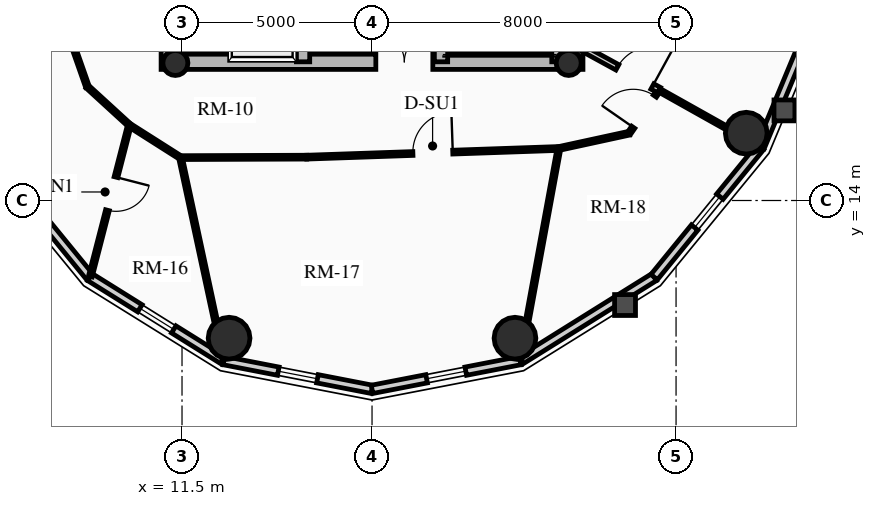
"""IFC4 building model, lengths in metres.
Left out: names, types, materials, properties, quantities, classifications, styles, units other than length and angle.
Written with IfcOpenShell. Run it as: python <this file> out.ifc"""

import sys

from ifc_helpers import new_model, si_unit, direction, frame, frame_2d, origin, origin_2d, place, context, subcontext, project, spatial, rectangle, circle, hollow_circle, extrude, source, transform, mapped, element, fill, save


model = new_model("IFC4")
c1 = context("Model", 3, precision=1e-05, world=origin(), true_north=direction((0.0, 1.0)))
c2 = subcontext(c1, "Body", "Model", "MODEL_VIEW")
j1 = project(units=[si_unit("LENGTHUNIT", "METRE"), si_unit("PLANEANGLEUNIT", "RADIAN")], contexts=[c1])
p1 = place(None, origin())
s1 = spatial("IfcSite", under=j1, at=p1, CompositionType="ELEMENT")
p2 = place(p1, origin())
s2 = spatial("IfcBuilding", under=s1, at=p2, CompositionType="ELEMENT")
p3 = place(p2, frame((0.0, 0.0, 229.25)))
s3 = spatial("IfcBuildingStorey", under=s2, at=p3, CompositionType="ELEMENT", Elevation=229.25)
for number, where, z_axis, x_axis in (
    (1, (11.15, 17.45, 0.0), (0.0, 0.0, 1.0), (0.0, 1.0, 0.0)),
    (2, (21.85, 17.45, 0.0), (0.0, 0.0, 1.0), (0.0, 1.0, 0.0)),
):
    element("IfcWall", number, at=place(p3, frame(where, z_axis=z_axis, x_axis=x_axis)), inside=s3, PredefinedType="SHEAR", context=c2, shape_type="SweptSolid", body=[
        extrude(rectangle(XDim=14.1, YDim=0.4, at=frame_2d((7.05, 0.0))), origin(), (0.0, 0.0, 1.0), 3.2),
    ])
p4 = place(p3, frame((11.15, 17.65, 0.0), z_axis=(0.0, 0.0, 1.0), x_axis=(1.0, 0.0, 0.0)))
e3 = element("IfcWall", 3, at=p4, inside=s3, PredefinedType="SHEAR", context=c2, shape_type="SweptSolid", body=[
    extrude(rectangle(XDim=10.7, YDim=0.4, at=frame_2d((5.35, 0.0))), origin(), (0.0, 0.0, 1.0), 3.2),
])
m1 = source(origin(), c2, "Body", "SweptSolid", [
    extrude(rectangle(XDim=1.5, YDim=2.02, at=frame_2d((0.75, 1.01))), frame((0.0, 0.21, 0.0), z_axis=(0.0, -1.0, 0.0), x_axis=(1.0, 0.0, 0.0)), (0.0, 0.0, 1.0), 0.42),
])
p5 = place(p4, frame((5.45, 0.0, 0.0)))
e4 = element("IfcOpeningElement", 4, at=p5, cuts=e3, PredefinedType="OPENING", context=c2, shape_type="MappedRepresentation", body=[
    mapped(m1, transform((0.0, 0.0, 0.0), x_axis=(1.0, 0.0, 0.0), y_axis=(0.0, 1.0, 0.0), z_axis=(0.0, 0.0, 1.0), scale=1.0)),
])
p6 = place(p3, frame((14.685, 17.65, 0.0), z_axis=(0.0, 0.0, 1.0), x_axis=(0.0, 1.0, 0.0)))
e5 = element("IfcWall", 5, at=p6, inside=s3, PredefinedType="SHEAR", context=c2, shape_type="SweptSolid", body=[
    extrude(rectangle(XDim=13.7, YDim=0.35, at=frame_2d((6.85, 0.0))), origin(), (0.0, 0.0, 1.0), 3.2),
])
m2 = source(origin(), c2, "Body", "SweptSolid", [
    extrude(rectangle(XDim=1.1, YDim=2.015, at=frame_2d((0.55, 1.007))), frame((0.0, 0.185, 0.0), z_axis=(0.0, -1.0, 0.0), x_axis=(1.0, 0.0, 0.0)), (0.0, 0.0, 1.0), 0.37),
])
p7 = place(p6, frame((4.85, 0.0, 0.0)))
e6 = element("IfcOpeningElement", 6, at=p7, cuts=e5, PredefinedType="OPENING", context=c2, shape_type="MappedRepresentation", body=[
    mapped(m2, transform((0.0, 0.0, 0.0), x_axis=(1.0, 0.0, 0.0), y_axis=(0.0, 1.0, 0.0), z_axis=(0.0, 0.0, 1.0), scale=1.0)),
])
p8 = place(p6, frame((0.625, 0.0, 0.0)))
e7 = element("IfcOpeningElement", 7, at=p8, cuts=e5, PredefinedType="OPENING", context=c2, shape_type="MappedRepresentation", body=[
    mapped(m2, transform((0.0, 0.0, 0.0), x_axis=(1.0, 0.0, 0.0), y_axis=(0.0, 1.0, 0.0), z_axis=(0.0, 0.0, 1.0), scale=1.0)),
])
p9 = place(p6, frame((2.625, 0.0, 0.0)))
e8 = element("IfcOpeningElement", 8, at=p9, cuts=e5, PredefinedType="OPENING", context=c2, shape_type="MappedRepresentation", body=[
    mapped(m2, transform((0.0, 0.0, 0.0), x_axis=(1.0, 0.0, 0.0), y_axis=(0.0, 1.0, 0.0), z_axis=(0.0, 0.0, 1.0), scale=1.0)),
])
m3 = source(origin(), c2, "Body", "SweptSolid", [
    extrude(rectangle(XDim=1.15, YDim=2.02, at=frame_2d((0.575, 1.01))), frame((0.0, 0.185, 0.0), z_axis=(0.0, -1.0, 0.0), x_axis=(1.0, 0.0, 0.0)), (0.0, 0.0, 1.0), 0.37),
])
p10 = place(p6, frame((7.27, 0.0, 0.0)))
e9 = element("IfcOpeningElement", 9, at=p10, cuts=e5, PredefinedType="OPENING", context=c2, shape_type="MappedRepresentation", body=[
    mapped(m3, transform((0.0, 0.0, 0.0), x_axis=(1.0, 0.0, 0.0), y_axis=(0.0, 1.0, 0.0), z_axis=(0.0, 0.0, 1.0), scale=1.0)),
])
p11 = place(p3, frame((18.315, 17.65, 0.0), z_axis=(0.0, 0.0, 1.0), x_axis=(0.0, 1.0, 0.0)))
e10 = element("IfcWall", 10, at=p11, inside=s3, PredefinedType="SHEAR", context=c2, shape_type="SweptSolid", body=[
    extrude(rectangle(XDim=9.6, YDim=0.35, at=frame_2d((4.8, 0.0))), origin(), (0.0, 0.0, 1.0), 3.2),
])
p12 = place(p11, frame((5.28, 0.0, 0.0)))
e11 = element("IfcOpeningElement", 11, at=p12, cuts=e10, PredefinedType="OPENING", context=c2, shape_type="MappedRepresentation", body=[
    mapped(m3, transform((0.0, 0.0, 0.0), x_axis=(1.0, 0.0, 0.0), y_axis=(0.0, 1.0, 0.0), z_axis=(0.0, 0.0, 1.0), scale=1.0)),
])
p13 = place(p3, frame((21.405, 17.65, 0.0), z_axis=(0.0, 0.0, 1.0), x_axis=(0.0, 1.0, 0.0)))
e12 = element("IfcWall", 12, at=p13, inside=s3, PredefinedType="SHEAR", context=c2, shape_type="SweptSolid", body=[
    extrude(rectangle(XDim=6.695, YDim=0.35, at=frame_2d((3.348, 0.0))), origin(), (0.0, 0.0, 1.0), 3.2),
])
for number, where, z_axis, x_axis in (
    (13, (11.325, 17.62, 0.0), (0.0, 0.0, 1.0), (1.0, 0.0, 0.0)),
    (14, (21.675, 17.62, 0.0), (0.0, 0.0, 1.0), (1.0, 0.0, 0.0)),
):
    element("IfcColumn", number, at=place(p3, frame(where, z_axis=z_axis, x_axis=x_axis)), inside=s3, PredefinedType="COLUMN", context=c2, shape_type="SweptSolid", body=[
        extrude(hollow_circle(Radius=0.33, WallThickness=0.025, at=origin_2d()), origin(), (0.0, 0.0, 1.0), 3.2),
    ])
for number, where, z_axis, x_axis in (
    (15, (12.739, 10.377, 0.0), (0.0, 0.0, 1.0), (1.0, 0.0, 0.0)),
    (16, (20.261, 10.377, 0.0), (0.0, 0.0, 1.0), (1.0, 0.0, 0.0)),
    (17, (26.347, 15.771, 0.0), (0.0, 0.0, 1.0), (1.0, 0.0, 0.0)),
):
    element("IfcColumn", number, at=place(p3, frame(where, z_axis=z_axis, x_axis=x_axis)), inside=s3, PredefinedType="USERDEFINED", context=c2, shape_type="SweptSolid", body=[
        extrude(circle(Radius=0.55, at=origin_2d()), origin(), (0.0, 0.0, 1.0), 3.2),
    ])
p14 = place(p3, frame((9.076, 11.985, 0.0), z_axis=(0.0, 0.0, 1.0), x_axis=(-0.632467166636, 0.774587169483, 0.0)))
e18 = element("IfcWall", 18, at=p14, inside=s3, PredefinedType="SOLIDWALL", context=c2, shape_type="SweptSolid", body=[
    extrude(rectangle(XDim=4.418, YDim=0.22, at=frame_2d((2.209, 0.0))), origin(), (0.0, 0.0, 1.0), 2.612),
])
p15 = place(p3, frame((12.597, 9.787, 0.0), z_axis=(0.0, 0.0, 1.0), x_axis=(-0.848318713376, 0.529485939886, 0.0)))
e19 = element("IfcWall", 19, at=p15, inside=s3, PredefinedType="SOLIDWALL", context=c2, shape_type="SweptSolid", body=[
    extrude(rectangle(XDim=4.15, YDim=0.22, at=frame_2d((2.075, 0.0))), origin(), (0.0, 0.0, 1.0), 2.612),
])
m4 = source(origin(), c2, "Body", "SweptSolid", [
    extrude(rectangle(XDim=1.05, YDim=1.3, at=frame_2d((0.525, 0.65))), frame((0.0, 0.12, 0.0), z_axis=(0.0, -1.0, 0.0), x_axis=(1.0, 0.0, 0.0)), (0.0, 0.0, 1.0), 0.24),
])
p16 = place(p15, frame((1.55, 0.0, 0.65)))
e20 = element("IfcOpeningElement", 20, at=p16, cuts=e19, PredefinedType="OPENING", context=c2, shape_type="MappedRepresentation", body=[
    mapped(m4, transform((0.0, 0.0, 0.0), x_axis=(1.0, 0.0, 0.0), y_axis=(0.0, 1.0, 0.0), z_axis=(0.0, 0.0, 1.0), scale=1.0)),
])
p17 = place(p3, frame((16.5, 9.03, 0.0), z_axis=(0.0, 0.0, 1.0), x_axis=(-0.981700307484, 0.190432419211, 0.0)))
e21 = element("IfcWall", 21, at=p17, inside=s3, PredefinedType="SOLIDWALL", context=c2, shape_type="SweptSolid", body=[
    extrude(rectangle(XDim=3.976, YDim=0.22, at=frame_2d((1.988, 0.0))), origin(), (0.0, 0.0, 1.0), 2.612),
])
p18 = place(p17, frame((1.463, 0.0, 0.65)))
e22 = element("IfcOpeningElement", 22, at=p18, cuts=e21, PredefinedType="OPENING", context=c2, shape_type="MappedRepresentation", body=[
    mapped(m4, transform((0.0, 0.0, 0.0), x_axis=(1.0, 0.0, 0.0), y_axis=(0.0, 1.0, 0.0), z_axis=(0.0, 0.0, 1.0), scale=1.0)),
])
p19 = place(p3, frame((20.403, 9.787, 0.0), z_axis=(0.0, 0.0, 1.0), x_axis=(-0.981700307484, -0.190432419211, 0.0)))
e23 = element("IfcWall", 23, at=p19, inside=s3, PredefinedType="SOLIDWALL", context=c2, shape_type="SweptSolid", body=[
    extrude(rectangle(XDim=3.976, YDim=0.22, at=frame_2d((1.988, 0.0))), origin(), (0.0, 0.0, 1.0), 2.612),
])
p20 = place(p19, frame((1.463, 0.0, 0.65)))
e24 = element("IfcOpeningElement", 24, at=p20, cuts=e23, PredefinedType="OPENING", context=c2, shape_type="MappedRepresentation", body=[
    mapped(m4, transform((0.0, 0.0, 0.0), x_axis=(1.0, 0.0, 0.0), y_axis=(0.0, 1.0, 0.0), z_axis=(0.0, 0.0, 1.0), scale=1.0)),
])
p21 = place(p3, frame((23.924, 11.985, 0.0), z_axis=(0.0, 0.0, 1.0), x_axis=(-0.848318713376, -0.529485939886, 0.0)))
e25 = element("IfcWall", 25, at=p21, inside=s3, PredefinedType="SOLIDWALL", context=c2, shape_type="SweptSolid", body=[
    extrude(rectangle(XDim=4.15, YDim=0.22, at=frame_2d((2.075, 0.0))), origin(), (0.0, 0.0, 1.0), 2.612),
])
p22 = place(p3, frame((26.718, 15.407, 0.0), z_axis=(0.0, 0.0, 1.0), x_axis=(-0.632467166636, -0.774587169483, 0.0)))
e26 = element("IfcWall", 26, at=p22, inside=s3, PredefinedType="SOLIDWALL", context=c2, shape_type="SweptSolid", body=[
    extrude(rectangle(XDim=4.418, YDim=0.22, at=frame_2d((2.209, 0.0))), origin(), (0.0, 0.0, 1.0), 2.612),
])
p23 = place(p22, frame((1.684, 0.0, 0.65)))
e27 = element("IfcOpeningElement", 27, at=p23, cuts=e26, PredefinedType="OPENING", context=c2, shape_type="MappedRepresentation", body=[
    mapped(m4, transform((0.0, 0.0, 0.0), x_axis=(1.0, 0.0, 0.0), y_axis=(0.0, 1.0, 0.0), z_axis=(0.0, 0.0, 1.0), scale=1.0)),
])
p24 = place(p3, frame((28.512, 19.719, 0.0), z_axis=(0.0, 0.0, 1.0), x_axis=(-0.384036305194, -0.923317993052, 0.0)))
e28 = element("IfcWall", 28, at=p24, inside=s3, PredefinedType="SOLIDWALL", context=c2, shape_type="SweptSolid", body=[
    extrude(rectangle(XDim=4.671, YDim=0.22, at=frame_2d((2.335, 0.0))), origin(), (0.0, 0.0, 1.0), 2.612),
])
p25 = place(p3, frame((8.538, 18.338, 0.0), z_axis=(0.0, 0.0, 1.0), x_axis=(0.331358150167, -0.94350504838, 0.0)))
e29 = element("IfcWall", 29, at=p25, inside=s3, PredefinedType="MOVABLE", context=c2, shape_type="SweptSolid", body=[
    extrude(rectangle(XDim=1.424, YDim=0.1, at=frame_2d((0.712, 0.0))), origin(), (0.0, 0.0, 1.0), 2.545),
])
p26 = place(p3, frame((9.01, 16.994, 0.0), z_axis=(0.0, 0.0, 1.0), x_axis=(0.737701798986, -0.67512669609, 0.0)))
e30 = element("IfcWall", 30, at=p26, inside=s3, PredefinedType="MOVABLE", context=c2, shape_type="SweptSolid", body=[
    extrude(rectangle(XDim=1.498, YDim=0.1, at=frame_2d((0.749, 0.0))), origin(), (0.0, 0.0, 1.0), 2.612),
])
p27 = place(p3, frame((10.115, 15.983, 0.0), z_axis=(0.0, 0.0, 1.0), x_axis=(0.843995849351, -0.536349705209, 0.0)))
e31 = element("IfcWall", 31, at=p27, inside=s3, PredefinedType="MOVABLE", context=c2, shape_type="SweptSolid", body=[
    extrude(rectangle(XDim=1.593, YDim=0.1, at=frame_2d((0.796, 0.0))), origin(), (0.0, 0.0, 1.0), 2.545),
])
p28 = place(p3, frame((11.46, 15.129, 0.0), z_axis=(0.0, 0.0, 1.0), x_axis=(0.999993513287, 0.003601858435, 0.0)))
e32 = element("IfcWall", 32, at=p28, inside=s3, PredefinedType="MOVABLE", context=c2, shape_type="SweptSolid", body=[
    extrude(rectangle(XDim=3.321, YDim=0.1, at=frame_2d((1.661, 0.0))), origin(), (0.0, 0.0, 1.0), 2.612),
])
p29 = place(p3, frame((14.781, 15.141, 0.0), z_axis=(0.0, 0.0, 1.0), x_axis=(0.999407918707, 0.034406569513, 0.0)))
e33 = element("IfcWall", 33, at=p29, inside=s3, PredefinedType="MOVABLE", context=c2, shape_type="SweptSolid", body=[
    extrude(rectangle(XDim=6.642, YDim=0.1, at=frame_2d((3.321, 0.0))), origin(), (0.0, 0.0, 1.0), 2.545),
])
m5 = source(origin(), c2, "Body", "SweptSolid", [
    extrude(rectangle(XDim=1.05, YDim=2.015, at=frame_2d((0.525, 1.007))), frame((0.0, 0.06, 0.0), z_axis=(0.0, -1.0, 0.0), x_axis=(1.0, 0.0, 0.0)), (0.0, 0.0, 1.0), 0.12),
])
p30 = place(p29, frame((2.796, 0.0, 0.0)))
e34 = element("IfcOpeningElement", 34, at=p30, cuts=e33, PredefinedType="OPENING", context=c2, shape_type="MappedRepresentation", body=[
    mapped(m5, transform((0.0, 0.0, 0.0), x_axis=(1.0, 0.0, 0.0), y_axis=(0.0, 1.0, 0.0), z_axis=(0.0, 0.0, 1.0), scale=1.0)),
])
p31 = place(p3, frame((21.419, 15.369, 0.0), z_axis=(0.0, 0.0, 1.0), x_axis=(0.977192701953, 0.212354475464, 0.0)))
e35 = element("IfcWall", 35, at=p31, inside=s3, PredefinedType="MOVABLE", context=c2, shape_type="SweptSolid", body=[
    extrude(rectangle(XDim=1.888, YDim=0.1, at=frame_2d((0.944, 0.0))), origin(), (0.0, 0.0, 1.0), 2.545),
])
p32 = place(p3, frame((23.263, 15.77, 0.0), z_axis=(0.0, 0.0, 1.0), x_axis=(0.570743456919, 0.821128434768, 0.0)))
e36 = element("IfcWall", 36, at=p32, inside=s3, PredefinedType="MOVABLE", context=c2, shape_type="SweptSolid", body=[
    extrude(rectangle(XDim=1.382, YDim=0.1, at=frame_2d((0.691, 0.0))), origin(), (0.0, 0.0, 1.0), 2.612),
])
m6 = source(origin(), c2, "Body", "SweptSolid", [
    extrude(rectangle(XDim=1.0, YDim=2.015, at=frame_2d((0.5, 1.007))), frame((0.0, 0.06, 0.0), z_axis=(0.0, -1.0, 0.0), x_axis=(1.0, 0.0, 0.0)), (0.0, 0.0, 1.0), 0.12),
])
p33 = place(p32, frame((0.191, 0.0, 0.0)))
e37 = element("IfcOpeningElement", 37, at=p33, cuts=e36, PredefinedType="OPENING", context=c2, shape_type="MappedRepresentation", body=[
    mapped(m6, transform((0.0, 0.0, 0.0), x_axis=(1.0, 0.0, 0.0), y_axis=(0.0, 1.0, 0.0), z_axis=(0.0, 0.0, 1.0), scale=1.0)),
])
p34 = place(p3, frame((11.46, 15.129, 0.0), z_axis=(0.0, 0.0, 1.0), x_axis=(0.210058897642, -0.977688733453, 0.0)))
e38 = element("IfcWall", 38, at=p34, inside=s3, PredefinedType="MOVABLE", context=c2, shape_type="SweptSolid", body=[
    extrude(rectangle(XDim=5.444, YDim=0.1, at=frame_2d((2.722, 0.0))), origin(), (0.0, 0.0, 1.0), 2.612),
])
p35 = place(p3, frame((21.419, 15.369, 0.0), z_axis=(0.0, 0.0, 1.0), x_axis=(-0.180685606423, -0.98354090491, 0.0)))
e39 = element("IfcWall", 39, at=p35, inside=s3, PredefinedType="MOVABLE", context=c2, shape_type="SweptSolid", body=[
    extrude(rectangle(XDim=5.656, YDim=0.1, at=frame_2d((2.828, 0.0))), origin(), (0.0, 0.0, 1.0), 2.612),
])
p36 = place(p3, frame((24.052, 16.905, 0.0), z_axis=(0.0, 0.0, 1.0), x_axis=(0.872220814965, -0.489112308106, 0.0)))
e40 = element("IfcWall", 40, at=p36, inside=s3, PredefinedType="MOVABLE", context=c2, shape_type="SweptSolid", body=[
    extrude(rectangle(XDim=3.038, YDim=0.1, at=frame_2d((1.519, 0.0))), origin(), (0.0, 0.0, 1.0), 2.612),
])
p37 = place(p3, frame((22.05, 18.0, 0.0), z_axis=(0.0, 0.0, 1.0), x_axis=(0.877252891813, -0.480028503118, 0.0)))
e41 = element("IfcWall", 41, at=p37, inside=s3, PredefinedType="PARTITIONING", context=c2, shape_type="SweptSolid", body=[
    extrude(rectangle(XDim=2.282, YDim=0.16, at=frame_2d((1.141, 0.0))), origin(), (0.0, 0.0, 1.0), 2.545),
])
m7 = source(origin(), c2, "Body", "SweptSolid", [
    extrude(rectangle(XDim=1.05, YDim=2.015, at=frame_2d((0.525, 1.007))), frame((0.0, 0.09, 0.0), z_axis=(0.0, -1.0, 0.0), x_axis=(1.0, 0.0, 0.0)), (0.0, 0.0, 1.0), 0.18),
])
p38 = place(p37, frame((1.032, 0.0, 0.0)))
e42 = element("IfcOpeningElement", 42, at=p38, cuts=e41, PredefinedType="OPENING", context=c2, shape_type="MappedRepresentation", body=[
    mapped(m7, transform((0.0, 0.0, 0.0), x_axis=(1.0, 0.0, 0.0), y_axis=(0.0, 1.0, 0.0), z_axis=(0.0, 0.0, 1.0), scale=1.0)),
])
p39 = place(p3, frame((10.115, 15.983, 0.0), z_axis=(0.0, 0.0, 1.0), x_axis=(-0.249861860474, -0.968281493513, 0.0)))
e43 = element("IfcWall", 43, at=p39, inside=s3, PredefinedType="MOVABLE", context=c2, shape_type="SweptSolid", body=[
    extrude(rectangle(XDim=4.113, YDim=0.1, at=frame_2d((2.056, 0.0))), origin(), (0.0, 0.0, 1.0), 2.545),
])
m8 = source(origin(), c2, "Body", "SweptSolid", [
    extrude(rectangle(XDim=0.9, YDim=2.005, at=frame_2d((0.45, 1.002))), frame((0.0, 0.06, 0.0), z_axis=(0.0, -1.0, 0.0), x_axis=(1.0, 0.0, 0.0)), (0.0, 0.0, 1.0), 0.12),
])
p40 = place(p39, frame((1.413, 0.0, 0.0)))
e44 = element("IfcOpeningElement", 44, at=p40, cuts=e43, PredefinedType="OPENING", context=c2, shape_type="MappedRepresentation", body=[
    mapped(m8, transform((0.0, 0.0, 0.0), x_axis=(1.0, 0.0, 0.0), y_axis=(0.0, 1.0, 0.0), z_axis=(0.0, 0.0, 1.0), scale=1.0)),
])
m9 = source(origin(), c2, "Body", "SweptSolid", [
    extrude(rectangle(XDim=1.05, YDim=1.3, at=frame_2d((0.525, 0.65))), frame((0.0, 0.03, 0.0), z_axis=(0.0, -1.0, 0.0), x_axis=(1.0, 0.0, 0.0)), (0.0, 0.0, 1.0), 0.06),
])
p41 = place(p16, origin())
e45 = element("IfcWindow", 45, at=p41, inside=s3, PartitioningType="SINGLE_PANEL", PredefinedType="WINDOW", context=c2, shape_type="MappedRepresentation", body=[
    mapped(m9, transform((0.0, 0.0, 0.0), x_axis=(1.0, 0.0, 0.0), y_axis=(0.0, 1.0, 0.0), z_axis=(0.0, 0.0, 1.0), scale=1.0)),
])
fill(e20, e45)
p42 = place(p18, origin())
e46 = element("IfcWindow", 46, at=p42, inside=s3, PartitioningType="SINGLE_PANEL", PredefinedType="WINDOW", context=c2, shape_type="MappedRepresentation", body=[
    mapped(m9, transform((0.0, 0.0, 0.0), x_axis=(1.0, 0.0, 0.0), y_axis=(0.0, 1.0, 0.0), z_axis=(0.0, 0.0, 1.0), scale=1.0)),
])
fill(e22, e46)
p43 = place(p20, origin())
e47 = element("IfcWindow", 47, at=p43, inside=s3, PartitioningType="SINGLE_PANEL", PredefinedType="WINDOW", context=c2, shape_type="MappedRepresentation", body=[
    mapped(m9, transform((0.0, 0.0, 0.0), x_axis=(1.0, 0.0, 0.0), y_axis=(0.0, 1.0, 0.0), z_axis=(0.0, 0.0, 1.0), scale=1.0)),
])
fill(e24, e47)
p44 = place(p23, origin())
e48 = element("IfcWindow", 48, at=p44, inside=s3, PartitioningType="SINGLE_PANEL", PredefinedType="WINDOW", context=c2, shape_type="MappedRepresentation", body=[
    mapped(m9, transform((0.0, 0.0, 0.0), x_axis=(1.0, 0.0, 0.0), y_axis=(0.0, 1.0, 0.0), z_axis=(0.0, 0.0, 1.0), scale=1.0)),
])
fill(e27, e48)
m10 = source(origin(), c2, "Body", "SweptSolid", [
    extrude(rectangle(XDim=1.5, YDim=2.02, at=frame_2d((0.75, 1.01))), frame((0.0, 0.025, 0.0), z_axis=(0.0, -1.0, 0.0), x_axis=(1.0, 0.0, 0.0)), (0.0, 0.0, 1.0), 0.05),
])
p45 = place(p5, origin())
e49 = element("IfcDoor", 49, at=p45, inside=s3, OperationType="DOUBLE_DOOR_SINGLE_SWING", PredefinedType="DOOR", context=c2, shape_type="MappedRepresentation", body=[
    mapped(m10, transform((0.0, 0.0, 0.0), x_axis=(1.0, 0.0, 0.0), y_axis=(0.0, 1.0, 0.0), z_axis=(0.0, 0.0, 1.0), scale=1.0)),
])
fill(e4, e49)
m11 = source(origin(), c2, "Body", "SweptSolid", [
    extrude(rectangle(XDim=1.05, YDim=2.015, at=frame_2d((0.525, 1.007))), frame((0.0, 0.025, 0.0), z_axis=(0.0, -1.0, 0.0), x_axis=(1.0, 0.0, 0.0)), (0.0, 0.0, 1.0), 0.05),
])
p46 = place(p38, origin())
e50 = element("IfcDoor", 50, at=p46, inside=s3, OperationType="SINGLE_SWING_RIGHT", PredefinedType="DOOR", context=c2, shape_type="MappedRepresentation", body=[
    mapped(m11, transform((0.0, 0.0, 0.0), x_axis=(1.0, 0.0, 0.0), y_axis=(0.0, 1.0, 0.0), z_axis=(0.0, 0.0, 1.0), scale=1.0)),
])
fill(e42, e50)
m12 = source(origin(), c2, "Body", "SweptSolid", [
    extrude(rectangle(XDim=0.9, YDim=2.005, at=frame_2d((0.45, 1.002))), frame((0.0, 0.025, 0.0), z_axis=(0.0, -1.0, 0.0), x_axis=(1.0, 0.0, 0.0)), (0.0, 0.0, 1.0), 0.05),
])
p47 = place(p40, origin())
e51 = element("IfcDoor", 51, at=p47, inside=s3, OperationType="SINGLE_SWING_LEFT", PredefinedType="DOOR", context=c2, shape_type="MappedRepresentation", body=[
    mapped(m12, transform((0.0, 0.0, 0.0), x_axis=(1.0, 0.0, 0.0), y_axis=(0.0, 1.0, 0.0), z_axis=(0.0, 0.0, 1.0), scale=1.0)),
])
fill(e44, e51)
p48 = place(p30, origin())
e52 = element("IfcDoor", 52, at=p48, inside=s3, OperationType="SINGLE_SWING_RIGHT", PredefinedType="DOOR", context=c2, shape_type="MappedRepresentation", body=[
    mapped(m11, transform((0.0, 0.0, 0.0), x_axis=(1.0, 0.0, 0.0), y_axis=(0.0, 1.0, 0.0), z_axis=(0.0, 0.0, 1.0), scale=1.0)),
])
fill(e34, e52)
m13 = source(origin(), c2, "Body", "SweptSolid", [
    extrude(rectangle(XDim=1.0, YDim=2.015, at=frame_2d((0.5, 1.007))), frame((0.0, 0.025, 0.0), z_axis=(0.0, -1.0, 0.0), x_axis=(1.0, 0.0, 0.0)), (0.0, 0.0, 1.0), 0.05),
])
p49 = place(p33, origin())
e53 = element("IfcDoor", 53, at=p49, inside=s3, OperationType="SINGLE_SWING_LEFT", PredefinedType="DOOR", context=c2, shape_type="MappedRepresentation", body=[
    mapped(m13, transform((0.0, 0.0, 0.0), x_axis=(1.0, 0.0, 0.0), y_axis=(0.0, 1.0, 0.0), z_axis=(0.0, 0.0, 1.0), scale=1.0)),
])
fill(e37, e53)
save(model, sys.argv[1])
